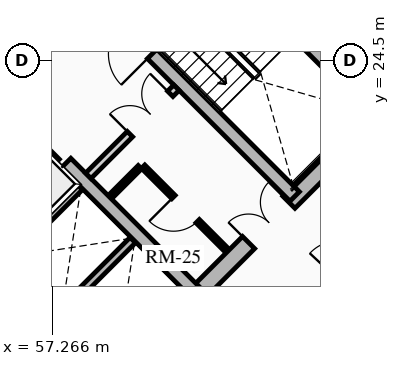
"""IFC4 building model, lengths in metres.
Left out: names, types, materials, properties, quantities, classifications, styles, units other than length and angle.
Written with IfcOpenShell. Run it as: python <this file> out.ifc"""

import sys

from ifc_helpers import new_model, si_unit, direction, frame, frame_2d, origin, place, context, subcontext, project, spatial, rectangle, extrude, source, transform, mapped, element, fill, save


model = new_model("IFC4")
c1 = context("Model", 3, precision=1e-05, world=origin(), true_north=direction((0.0, 1.0)))
c2 = subcontext(c1, "Body", "Model", "MODEL_VIEW")
j1 = project(units=[si_unit("LENGTHUNIT", "METRE"), si_unit("PLANEANGLEUNIT", "RADIAN")], contexts=[c1])
p1 = place(None, origin())
s1 = spatial("IfcSite", under=j1, at=p1, CompositionType="ELEMENT")
p2 = place(p1, origin())
s2 = spatial("IfcBuilding", under=s1, at=p2, CompositionType="ELEMENT")
p3 = place(p2, frame((0.0, 0.0, 84.7)))
s3 = spatial("IfcBuildingStorey", under=s2, at=p3, CompositionType="ELEMENT", Elevation=84.7)
for number, where, z_axis, x_axis in (
    (1, (58.737, 15.697, 0.0), (0.0, 0.0, 1.0), (-0.707, 0.707, 0.0)),
    (2, (66.303, 23.263, 0.0), (0.0, 0.0, 1.0), (-0.707, 0.707, 0.0)),
):
    element("IfcWall", number, at=place(p3, frame(where, z_axis=z_axis, x_axis=x_axis)), inside=s3, PredefinedType="SHEAR", context=c2, shape_type="SweptSolid", body=[
        extrude(rectangle(XDim=14.2, YDim=0.45, at=frame_2d((7.1, 0.0))), origin(), (0.0, 0.0, 1.0), 2.91),
    ])
p4 = place(p3, frame((58.578, 15.856, 0.0), z_axis=(0.0, 0.0, 1.0), x_axis=(0.707106781187, 0.707106781187, 0.0)))
e3 = element("IfcWall", 3, at=p4, inside=s3, PredefinedType="SHEAR", context=c2, shape_type="SweptSolid", body=[
    extrude(rectangle(XDim=10.7, YDim=0.45, at=frame_2d((5.35, 0.0))), origin(), (0.0, 0.0, 1.0), 2.91),
])
m1 = source(origin(), c2, "Body", "SweptSolid", [
    extrude(rectangle(XDim=1.5, YDim=2.02, at=frame_2d((0.75, 1.01))), frame((0.0, 0.235, 0.0), z_axis=(0.0, -1.0, 0.0), x_axis=(1.0, 0.0, 0.0)), (0.0, 0.0, 1.0), 0.47),
])
p5 = place(p4, frame((5.45, 0.0, 0.0)))
e4 = element("IfcOpeningElement", 4, at=p5, cuts=e3, PredefinedType="OPENING", context=c2, shape_type="MappedRepresentation", body=[
    mapped(m1, transform((0.0, 0.0, 0.0), x_axis=(1.0, 0.0, 0.0), y_axis=(0.0, 1.0, 0.0), z_axis=(0.0, 0.0, 1.0), scale=1.0)),
])
p6 = place(p3, frame((61.078, 18.355, 0.0), z_axis=(0.0, 0.0, 1.0), x_axis=(-0.707106781187, 0.707106781187, 0.0)))
e5 = element("IfcWall", 5, at=p6, inside=s3, PredefinedType="SHEAR", context=c2, shape_type="SweptSolid", body=[
    extrude(rectangle(XDim=13.75, YDim=0.35, at=frame_2d((6.875, 0.0))), origin(), (0.0, 0.0, 1.0), 2.91),
])
m2 = source(origin(), c2, "Body", "SweptSolid", [
    extrude(rectangle(XDim=1.1, YDim=2.015, at=frame_2d((0.55, 1.007))), frame((0.0, 0.185, 0.0), z_axis=(0.0, -1.0, 0.0), x_axis=(1.0, 0.0, 0.0)), (0.0, 0.0, 1.0), 0.37),
])
p7 = place(p6, frame((4.875, 0.0, 0.0)))
e6 = element("IfcOpeningElement", 6, at=p7, cuts=e5, PredefinedType="OPENING", context=c2, shape_type="MappedRepresentation", body=[
    mapped(m2, transform((0.0, 0.0, 0.0), x_axis=(1.0, 0.0, 0.0), y_axis=(0.0, 1.0, 0.0), z_axis=(0.0, 0.0, 1.0), scale=1.0)),
])
m3 = source(origin(), c2, "Body", "SweptSolid", [
    extrude(rectangle(XDim=1.15, YDim=2.02, at=frame_2d((0.575, 1.01))), frame((0.0, 0.185, 0.0), z_axis=(0.0, -1.0, 0.0), x_axis=(1.0, 0.0, 0.0)), (0.0, 0.0, 1.0), 0.37),
])
p8 = place(p6, frame((7.295, 0.0, 0.0)))
e7 = element("IfcOpeningElement", 7, at=p8, cuts=e5, PredefinedType="OPENING", context=c2, shape_type="MappedRepresentation", body=[
    mapped(m3, transform((0.0, 0.0, 0.0), x_axis=(1.0, 0.0, 0.0), y_axis=(0.0, 1.0, 0.0), z_axis=(0.0, 0.0, 1.0), scale=1.0)),
])
p9 = place(p3, frame((63.645, 20.922, 0.0), z_axis=(0.0, 0.0, 1.0), x_axis=(-0.707106781187, 0.707106781187, 0.0)))
e8 = element("IfcWall", 8, at=p9, inside=s3, PredefinedType="SHEAR", context=c2, shape_type="SweptSolid", body=[
    extrude(rectangle(XDim=13.75, YDim=0.35, at=frame_2d((6.875, 0.0))), origin(), (0.0, 0.0, 1.0), 2.91),
])
p10 = place(p9, frame((10.0, 0.0, 0.0)))
e9 = element("IfcOpeningElement", 9, at=p10, cuts=e8, PredefinedType="OPENING", context=c2, shape_type="MappedRepresentation", body=[
    mapped(m2, transform((0.0, 0.0, 0.0), x_axis=(1.0, 0.0, 0.0), y_axis=(0.0, 1.0, 0.0), z_axis=(0.0, 0.0, 1.0), scale=1.0)),
])
p11 = place(p9, frame((12.0, 0.0, 0.0)))
e10 = element("IfcOpeningElement", 10, at=p11, cuts=e8, PredefinedType="OPENING", context=c2, shape_type="MappedRepresentation", body=[
    mapped(m2, transform((0.0, 0.0, 0.0), x_axis=(1.0, 0.0, 0.0), y_axis=(0.0, 1.0, 0.0), z_axis=(0.0, 0.0, 1.0), scale=1.0)),
])
p12 = place(p9, frame((5.305, 0.0, 0.0)))
e11 = element("IfcOpeningElement", 11, at=p12, cuts=e8, PredefinedType="OPENING", context=c2, shape_type="MappedRepresentation", body=[
    mapped(m3, transform((0.0, 0.0, 0.0), x_axis=(1.0, 0.0, 0.0), y_axis=(0.0, 1.0, 0.0), z_axis=(0.0, 0.0, 1.0), scale=1.0)),
])
p13 = place(p3, frame((65.83, 23.107, 0.0), z_axis=(0.0, 0.0, 1.0), x_axis=(-0.707088616009, 0.707124945897, 0.0)))
e12 = element("IfcWall", 12, at=p13, inside=s3, PredefinedType="SHEAR", context=c2, shape_type="SweptSolid", body=[
    extrude(rectangle(XDim=6.72, YDim=0.35, at=frame_2d((3.36, 0.0))), origin(), (0.0, 0.0, 1.0), 2.91),
])
p14 = place(p3, frame((55.888, 19.069, 0.0), z_axis=(0.0, 0.0, 1.0), x_axis=(0.707106781187, 0.707106781187, 0.0)))
e13 = element("IfcWall", 13, at=p14, inside=s3, PredefinedType="SHEAR", context=c2, shape_type="SweptSolid", body=[
    extrude(rectangle(XDim=2.97, YDim=0.2, at=frame_2d((1.485, 0.0))), origin(), (0.0, 0.0, 1.0), 2.91),
])
p15 = place(p3, frame((57.284, 17.673, 0.0), z_axis=(0.0, 0.0, 1.0), x_axis=(0.707147878904, 0.70706568108, 0.0)))
e14 = element("IfcWall", 14, at=p15, inside=s3, PredefinedType="SHEAR", context=c2, shape_type="SweptSolid", body=[
    extrude(rectangle(XDim=2.97, YDim=0.2, at=frame_2d((1.485, 0.0))), origin(), (0.0, 0.0, 1.0), 2.91),
])
p16 = place(p3, frame((57.412, 17.97, 0.0), z_axis=(0.0, 0.0, 1.0), x_axis=(-0.707106781187, 0.707106781187, 0.0)))
e15 = element("IfcWall", 15, at=p16, inside=s3, PredefinedType="SHEAR", context=c2, shape_type="SweptSolid", body=[
    extrude(rectangle(XDim=1.735, YDim=0.2, at=frame_2d((0.867, 0.0))), origin(), (0.0, 0.0, 1.0), 2.91),
])
p17 = place(p3, frame((58.214, 21.467, 0.0), z_axis=(0.0, 0.0, 1.0), x_axis=(0.707106781187, 0.707106781187, 0.0)))
e16 = element("IfcWall", 16, at=p17, inside=s3, PredefinedType="PARTITIONING", context=c2, shape_type="SweptSolid", body=[
    extrude(rectangle(XDim=3.28, YDim=0.2, at=frame_2d((1.64, 0.0))), origin(), (0.0, 0.0, 1.0), 2.655),
])
m4 = source(origin(), c2, "Body", "SweptSolid", [
    extrude(rectangle(XDim=1.5, YDim=2.02, at=frame_2d((0.75, 1.01))), frame((0.0, 0.11, 0.0), z_axis=(0.0, -1.0, 0.0), x_axis=(1.0, 0.0, 0.0)), (0.0, 0.0, 1.0), 0.22),
])
p18 = place(p17, frame((1.55, 0.0, 0.0)))
e17 = element("IfcOpeningElement", 17, at=p18, cuts=e16, PredefinedType="OPENING", context=c2, shape_type="MappedRepresentation", body=[
    mapped(m4, transform((0.0, 0.0, 0.0), x_axis=(1.0, 0.0, 0.0), y_axis=(0.0, 1.0, 0.0), z_axis=(0.0, 0.0, 1.0), scale=1.0)),
])
p19 = place(p3, frame((54.961, 24.719, 0.0), z_axis=(0.0, 0.0, 1.0), x_axis=(0.707106781187, 0.707106781187, 0.0)))
e18 = element("IfcWall", 18, at=p19, inside=s3, PredefinedType="PARTITIONING", context=c2, shape_type="SweptSolid", body=[
    extrude(rectangle(XDim=3.28, YDim=0.2, at=frame_2d((1.64, 0.0))), origin(), (0.0, 0.0, 1.0), 2.655),
])
m5 = source(origin(), c2, "Body", "SweptSolid", [
    extrude(rectangle(XDim=0.9, YDim=2.005, at=frame_2d((0.45, 1.002))), frame((0.0, 0.11, 0.0), z_axis=(0.0, -1.0, 0.0), x_axis=(1.0, 0.0, 0.0)), (0.0, 0.0, 1.0), 0.22),
])
p20 = place(p19, frame((0.16, 0.0, 0.0)))
e19 = element("IfcOpeningElement", 19, at=p20, cuts=e18, PredefinedType="OPENING", context=c2, shape_type="MappedRepresentation", body=[
    mapped(m5, transform((0.0, 0.0, 0.0), x_axis=(1.0, 0.0, 0.0), y_axis=(0.0, 1.0, 0.0), z_axis=(0.0, 0.0, 1.0), scale=1.0)),
])
p21 = place(p3, frame((61.835, 19.529, 0.0), z_axis=(0.0, 0.0, 1.0), x_axis=(-0.707146413884, 0.707067146267, 0.0)))
e20 = element("IfcWall", 20, at=p21, inside=s3, PredefinedType="PARTITIONING", context=c2, shape_type="SweptSolid", body=[
    extrude(rectangle(XDim=3.08, YDim=0.125, at=frame_2d((1.54, 0.0))), origin(), (0.0, 0.0, 1.0), 2.655),
])
m6 = source(origin(), c2, "Body", "SweptSolid", [
    extrude(rectangle(XDim=0.9, YDim=2.005, at=frame_2d((0.45, 1.002))), frame((0.0, 0.073, 0.0), z_axis=(0.0, -1.0, 0.0), x_axis=(1.0, 0.0, 0.0)), (0.0, 0.0, 1.0), 0.145),
])
p22 = place(p21, frame((1.05, 0.0, 0.0)))
e21 = element("IfcOpeningElement", 21, at=p22, cuts=e20, PredefinedType="OPENING", context=c2, shape_type="MappedRepresentation", body=[
    mapped(m6, transform((0.0, 0.0, 0.0), x_axis=(1.0, 0.0, 0.0), y_axis=(0.0, 1.0, 0.0), z_axis=(0.0, 0.0, 1.0), scale=1.0)),
])
p23 = place(p3, frame((58.794, 20.915, 0.0), z_axis=(0.0, 0.0, 1.0), x_axis=(0.707106781187, 0.707106781187, 0.0)))
e22 = element("IfcWall", 22, at=p23, inside=s3, PredefinedType="PARTITIONING", context=c2, shape_type="SweptSolid", body=[
    extrude(rectangle(XDim=1.1, YDim=0.125, at=frame_2d((0.55, 0.0))), origin(), (0.0, 0.0, 1.0), 2.655),
])
p24 = place(p3, frame((62.903, 16.667, 0.0), z_axis=(0.0, 0.0, 1.0), x_axis=(0.682371947497, 0.731005147225, 0.0)))
e23 = element("IfcWall", 23, at=p24, inside=s3, PredefinedType="PARTITIONING", context=c2, shape_type="SweptSolid", body=[
    extrude(rectangle(XDim=6.642, YDim=0.15, at=frame_2d((3.321, 0.0))), origin(), (0.0, 0.0, 1.0), 2.225),
])
m7 = source(origin(), c2, "Body", "SweptSolid", [
    extrude(rectangle(XDim=1.05, YDim=2.015, at=frame_2d((0.525, 1.007))), frame((0.0, 0.085, 0.0), z_axis=(0.0, -1.0, 0.0), x_axis=(1.0, 0.0, 0.0)), (0.0, 0.0, 1.0), 0.17),
])
p25 = place(p24, frame((2.796, 0.0, 0.0)))
e24 = element("IfcOpeningElement", 24, at=p25, cuts=e23, PredefinedType="OPENING", context=c2, shape_type="MappedRepresentation", body=[
    mapped(m7, transform((0.0, 0.0, 0.0), x_axis=(1.0, 0.0, 0.0), y_axis=(0.0, 1.0, 0.0), z_axis=(0.0, 0.0, 1.0), scale=1.0)),
])
m8 = source(origin(), c2, "Body", "SweptSolid", [
    extrude(rectangle(XDim=1.1, YDim=2.015, at=frame_2d((0.55, 1.007))), frame((0.0, 0.025, 0.0), z_axis=(0.0, -1.0, 0.0), x_axis=(1.0, 0.0, 0.0)), (0.0, 0.0, 1.0), 0.05),
])
p26 = place(p7, origin())
e25 = element("IfcDoor", 25, at=p26, inside=s3, OperationType="SLIDING_TO_RIGHT", PredefinedType="DOOR", context=c2, shape_type="MappedRepresentation", body=[
    mapped(m8, transform((0.0, 0.0, 0.0), x_axis=(1.0, 0.0, 0.0), y_axis=(0.0, 1.0, 0.0), z_axis=(0.0, 0.0, 1.0), scale=1.0)),
])
fill(e6, e25)
m9 = source(origin(), c2, "Body", "SweptSolid", [
    extrude(rectangle(XDim=1.15, YDim=2.02, at=frame_2d((0.575, 1.01))), frame((0.0, 0.025, 0.0), z_axis=(0.0, -1.0, 0.0), x_axis=(1.0, 0.0, 0.0)), (0.0, 0.0, 1.0), 0.05),
])
p27 = place(p12, origin())
e26 = element("IfcDoor", 26, at=p27, inside=s3, OperationType="SINGLE_SWING_LEFT", PredefinedType="DOOR", context=c2, shape_type="MappedRepresentation", body=[
    mapped(m9, transform((0.0, 0.0, 0.0), x_axis=(1.0, 0.0, 0.0), y_axis=(0.0, 1.0, 0.0), z_axis=(0.0, 0.0, 1.0), scale=1.0)),
])
fill(e11, e26)
m10 = source(origin(), c2, "Body", "SweptSolid", [
    extrude(rectangle(XDim=1.5, YDim=2.02, at=frame_2d((0.75, 1.01))), frame((0.0, 0.025, 0.0), z_axis=(0.0, -1.0, 0.0), x_axis=(1.0, 0.0, 0.0)), (0.0, 0.0, 1.0), 0.05),
])
p28 = place(p5, origin())
e27 = element("IfcDoor", 27, at=p28, inside=s3, OperationType="DOUBLE_DOOR_SINGLE_SWING", PredefinedType="DOOR", context=c2, shape_type="MappedRepresentation", body=[
    mapped(m10, transform((0.0, 0.0, 0.0), x_axis=(1.0, 0.0, 0.0), y_axis=(0.0, 1.0, 0.0), z_axis=(0.0, 0.0, 1.0), scale=1.0)),
])
fill(e4, e27)
p29 = place(p18, origin())
e28 = element("IfcDoor", 28, at=p29, inside=s3, OperationType="DOUBLE_DOOR_SINGLE_SWING", PredefinedType="DOOR", context=c2, shape_type="MappedRepresentation", body=[
    mapped(m10, transform((0.0, 0.0, 0.0), x_axis=(1.0, 0.0, 0.0), y_axis=(0.0, 1.0, 0.0), z_axis=(0.0, 0.0, 1.0), scale=1.0)),
])
fill(e17, e28)
m11 = source(origin(), c2, "Body", "SweptSolid", [
    extrude(rectangle(XDim=0.9, YDim=2.005, at=frame_2d((0.45, 1.002))), frame((0.0, 0.025, 0.0), z_axis=(0.0, -1.0, 0.0), x_axis=(1.0, 0.0, 0.0)), (0.0, 0.0, 1.0), 0.05),
])
p30 = place(p22, origin())
e29 = element("IfcDoor", 29, at=p30, inside=s3, OperationType="SINGLE_SWING_RIGHT", PredefinedType="DOOR", context=c2, shape_type="MappedRepresentation", body=[
    mapped(m11, transform((0.0, 0.0, 0.0), x_axis=(1.0, 0.0, 0.0), y_axis=(0.0, 1.0, 0.0), z_axis=(0.0, 0.0, 1.0), scale=1.0)),
])
fill(e21, e29)
save(model, sys.argv[1])
